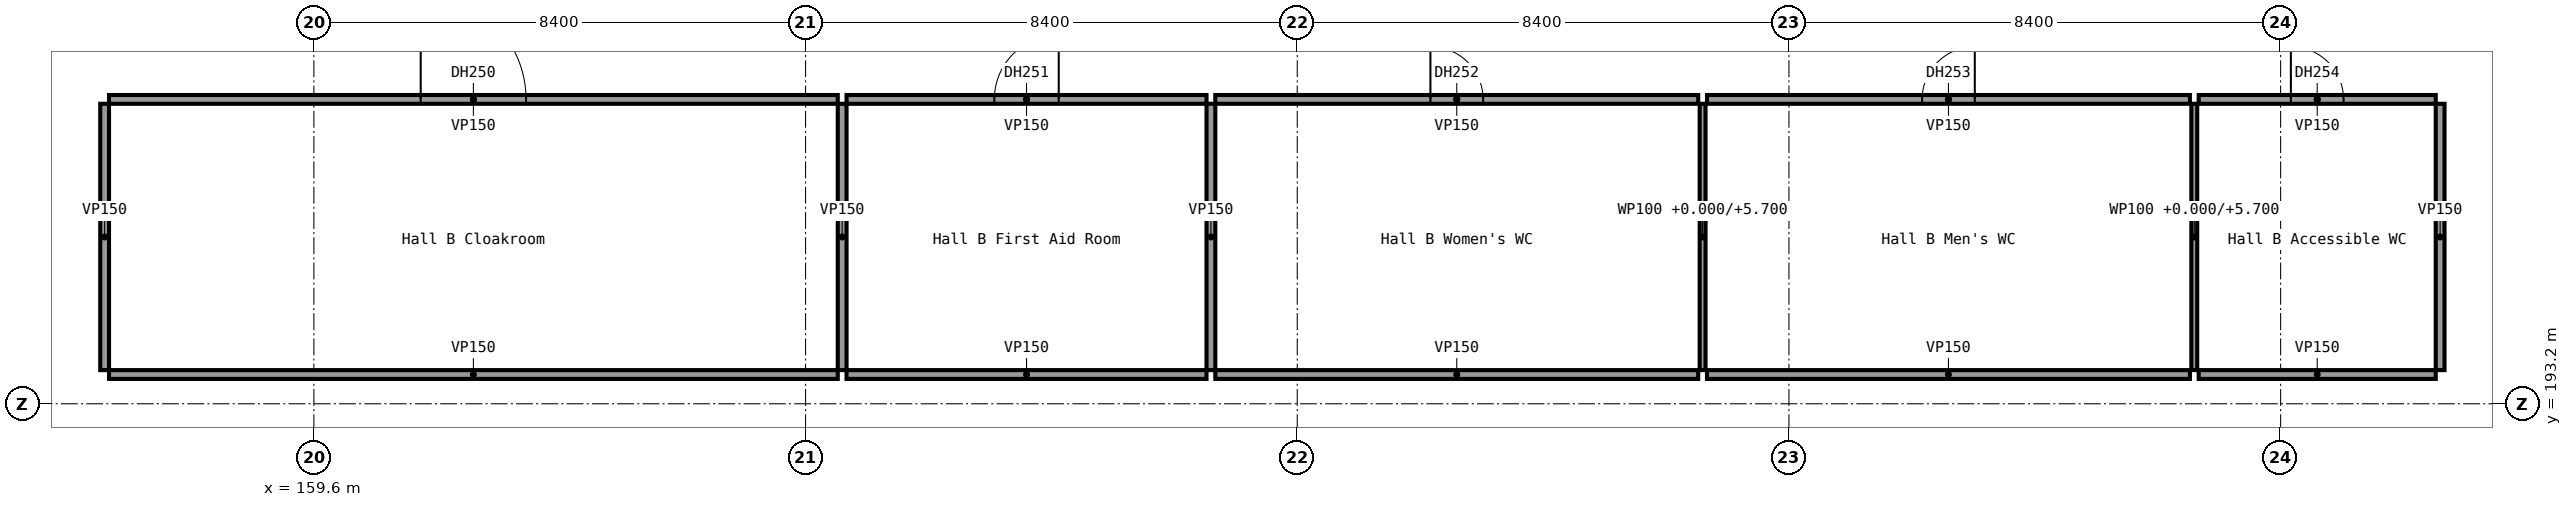
"""IFC4 building model, lengths in metres.
Left out: names, types, materials, properties, quantities, classifications, styles, units other than length and angle.
Written with IfcOpenShell. Run it as: python <this file> out.ifc"""

import sys

from ifc_helpers import new_model, si_unit, direction, frame, frame_2d, origin, place, context, subcontext, project, spatial, rectangle, extrude, element, fill, save


model = new_model("IFC4")
c1 = context("Model", 3, precision=1e-05, world=origin(), true_north=direction((0.0, 1.0)))
c2 = subcontext(c1, "Body", "Model", "MODEL_VIEW")
j1 = project(units=[si_unit("LENGTHUNIT", "METRE"), si_unit("PLANEANGLEUNIT", "RADIAN")], contexts=[c1])
p1 = place(None, origin())
s1 = spatial("IfcSite", under=j1, at=p1, CompositionType="ELEMENT")
p2 = place(p1, origin())
s2 = spatial("IfcBuilding", under=s1, at=p2, CompositionType="ELEMENT")
p3 = place(p2, origin())
s3 = spatial("IfcBuildingStorey", under=s2, at=p3, CompositionType="ELEMENT", Elevation=0.0)
p4 = place(p3, frame((156.1, 193.7, 0.0), z_axis=(0.0, 0.0, 1.0), x_axis=(1.0, 0.0, 0.0)))
e1 = element("IfcWall", 1, at=p4, inside=s3, PredefinedType="PARTITIONING", context=c2, shape_type="SweptSolid", body=[
    extrude(rectangle(XDim=12.45, YDim=0.15, at=frame_2d((6.225, 0.0))), origin(), (0.0, 0.0, 1.0), 5.7),
])
p5 = place(p3, frame((156.1, 198.4, 0.0), z_axis=(0.0, 0.0, 1.0), x_axis=(1.0, 0.0, 0.0)))
e2 = element("IfcWall", 2, at=p5, inside=s3, PredefinedType="PARTITIONING", context=c2, shape_type="SweptSolid", body=[
    extrude(rectangle(XDim=12.45, YDim=0.15, at=frame_2d((6.225, 0.0))), origin(), (0.0, 0.0, 1.0), 5.7),
])
p6 = place(p5, frame((5.325, 0.0, 0.0)))
e3 = element("IfcOpeningElement", 3, at=p6, cuts=e2, PredefinedType="OPENING", context=c2, shape_type="SweptSolid", body=[
    extrude(rectangle(XDim=1.8, YDim=2.1, at=frame_2d((0.9, 1.05))), frame((0.0, 0.075, 0.0), z_axis=(0.0, -1.0, 0.0), x_axis=(1.0, 0.0, 0.0)), (0.0, 0.0, 1.0), 0.15),
])
p7 = place(p3, frame((168.7, 193.7, 0.0), z_axis=(0.0, 0.0, 1.0), x_axis=(1.0, 0.0, 0.0)))
e4 = element("IfcWall", 4, at=p7, inside=s3, PredefinedType="PARTITIONING", context=c2, shape_type="SweptSolid", body=[
    extrude(rectangle(XDim=6.15, YDim=0.15, at=frame_2d((3.075, 0.0))), origin(), (0.0, 0.0, 1.0), 5.7),
])
p8 = place(p3, frame((168.7, 198.4, 0.0), z_axis=(0.0, 0.0, 1.0), x_axis=(1.0, 0.0, 0.0)))
e5 = element("IfcWall", 5, at=p8, inside=s3, PredefinedType="PARTITIONING", context=c2, shape_type="SweptSolid", body=[
    extrude(rectangle(XDim=6.15, YDim=0.15, at=frame_2d((3.075, 0.0))), origin(), (0.0, 0.0, 1.0), 5.7),
])
p9 = place(p8, frame((2.525, 0.0, 0.0)))
e6 = element("IfcOpeningElement", 6, at=p9, cuts=e5, PredefinedType="OPENING", context=c2, shape_type="SweptSolid", body=[
    extrude(rectangle(XDim=1.1, YDim=2.1, at=frame_2d((0.55, 1.05))), frame((0.0, 0.075, 0.0), z_axis=(0.0, -1.0, 0.0), x_axis=(1.0, 0.0, 0.0)), (0.0, 0.0, 1.0), 0.15),
])
p10 = place(p3, frame((175.0, 193.7, 0.0), z_axis=(0.0, 0.0, 1.0), x_axis=(1.0, 0.0, 0.0)))
e7 = element("IfcWall", 7, at=p10, inside=s3, PredefinedType="PARTITIONING", context=c2, shape_type="SweptSolid", body=[
    extrude(rectangle(XDim=8.25, YDim=0.15, at=frame_2d((4.125, 0.0))), origin(), (0.0, 0.0, 1.0), 5.7),
])
p11 = place(p3, frame((175.0, 198.4, 0.0), z_axis=(0.0, 0.0, 1.0), x_axis=(1.0, 0.0, 0.0)))
e8 = element("IfcWall", 8, at=p11, inside=s3, PredefinedType="PARTITIONING", context=c2, shape_type="SweptSolid", body=[
    extrude(rectangle(XDim=8.25, YDim=0.15, at=frame_2d((4.125, 0.0))), origin(), (0.0, 0.0, 1.0), 5.7),
])
p12 = place(p11, frame((3.675, 0.0, 0.0)))
e9 = element("IfcOpeningElement", 9, at=p12, cuts=e8, PredefinedType="OPENING", context=c2, shape_type="SweptSolid", body=[
    extrude(rectangle(XDim=0.9, YDim=2.1, at=frame_2d((0.45, 1.05))), frame((0.0, 0.075, 0.0), z_axis=(0.0, -1.0, 0.0), x_axis=(1.0, 0.0, 0.0)), (0.0, 0.0, 1.0), 0.15),
])
p13 = place(p3, frame((183.4, 193.7, 0.0), z_axis=(0.0, 0.0, 1.0), x_axis=(1.0, 0.0, 0.0)))
e10 = element("IfcWall", 10, at=p13, inside=s3, PredefinedType="PARTITIONING", context=c2, shape_type="SweptSolid", body=[
    extrude(rectangle(XDim=8.25, YDim=0.15, at=frame_2d((4.125, 0.0))), origin(), (0.0, 0.0, 1.0), 5.7),
])
p14 = place(p3, frame((183.4, 198.4, 0.0), z_axis=(0.0, 0.0, 1.0), x_axis=(1.0, 0.0, 0.0)))
e11 = element("IfcWall", 11, at=p14, inside=s3, PredefinedType="PARTITIONING", context=c2, shape_type="SweptSolid", body=[
    extrude(rectangle(XDim=8.25, YDim=0.15, at=frame_2d((4.125, 0.0))), origin(), (0.0, 0.0, 1.0), 5.7),
])
p15 = place(p14, frame((3.675, 0.0, 0.0)))
e12 = element("IfcOpeningElement", 12, at=p15, cuts=e11, PredefinedType="OPENING", context=c2, shape_type="SweptSolid", body=[
    extrude(rectangle(XDim=0.9, YDim=2.1, at=frame_2d((0.45, 1.05))), frame((0.0, 0.075, 0.0), z_axis=(0.0, -1.0, 0.0), x_axis=(1.0, 0.0, 0.0)), (0.0, 0.0, 1.0), 0.15),
])
p16 = place(p3, frame((191.8, 193.7, 0.0), z_axis=(0.0, 0.0, 1.0), x_axis=(1.0, 0.0, 0.0)))
e13 = element("IfcWall", 13, at=p16, inside=s3, PredefinedType="PARTITIONING", context=c2, shape_type="SweptSolid", body=[
    extrude(rectangle(XDim=4.05, YDim=0.15, at=frame_2d((2.025, 0.0))), origin(), (0.0, 0.0, 1.0), 5.7),
])
p17 = place(p3, frame((191.8, 198.4, 0.0), z_axis=(0.0, 0.0, 1.0), x_axis=(1.0, 0.0, 0.0)))
e14 = element("IfcWall", 14, at=p17, inside=s3, PredefinedType="PARTITIONING", context=c2, shape_type="SweptSolid", body=[
    extrude(rectangle(XDim=4.05, YDim=0.15, at=frame_2d((2.025, 0.0))), origin(), (0.0, 0.0, 1.0), 5.7),
])
p18 = place(p17, frame((1.575, 0.0, 0.0)))
e15 = element("IfcOpeningElement", 15, at=p18, cuts=e14, PredefinedType="OPENING", context=c2, shape_type="SweptSolid", body=[
    extrude(rectangle(XDim=0.9, YDim=2.1, at=frame_2d((0.45, 1.05))), frame((0.0, 0.075, 0.0), z_axis=(0.0, -1.0, 0.0), x_axis=(1.0, 0.0, 0.0)), (0.0, 0.0, 1.0), 0.15),
])
for number, where, z_axis, x_axis in (
    (16, (156.025, 193.775, 0.0), (0.0, 0.0, 1.0), (0.0, 1.0, 0.0)),
    (17, (168.625, 193.775, 0.0), (0.0, 0.0, 1.0), (0.0, 1.0, 0.0)),
    (18, (174.925, 193.775, 0.0), (0.0, 0.0, 1.0), (0.0, 1.0, 0.0)),
):
    element("IfcWall", number, at=place(p3, frame(where, z_axis=z_axis, x_axis=x_axis)), inside=s3, PredefinedType="PARTITIONING", context=c2, shape_type="SweptSolid", body=[
        extrude(rectangle(XDim=4.55, YDim=0.15, at=frame_2d((2.275, 0.0))), origin(), (0.0, 0.0, 1.0), 5.7),
    ])
for number, where, z_axis, x_axis in (
    (19, (183.325, 193.775, 0.0), (0.0, 0.0, 1.0), (0.0, 1.0, 0.0)),
    (20, (191.725, 193.775, 0.0), (0.0, 0.0, 1.0), (0.0, 1.0, 0.0)),
):
    element("IfcWall", number, at=place(p3, frame(where, z_axis=z_axis, x_axis=x_axis)), inside=s3, PredefinedType="PARTITIONING", context=c2, shape_type="SweptSolid", body=[
        extrude(rectangle(XDim=4.55, YDim=0.1, at=frame_2d((2.275, 0.0))), origin(), (0.0, 0.0, 1.0), 5.7),
    ])
p19 = place(p3, frame((195.925, 193.775, 0.0), z_axis=(0.0, 0.0, 1.0), x_axis=(0.0, 1.0, 0.0)))
e21 = element("IfcWall", 21, at=p19, inside=s3, PredefinedType="PARTITIONING", context=c2, shape_type="SweptSolid", body=[
    extrude(rectangle(XDim=4.55, YDim=0.15, at=frame_2d((2.275, 0.0))), origin(), (0.0, 0.0, 1.0), 5.7),
])
p20 = place(p6, origin())
e22 = element("IfcDoor", 22, at=p20, inside=s3, OperationType="DOUBLE_DOOR_SINGLE_SWING", PredefinedType="DOOR", context=c2, shape_type="SweptSolid", body=[
    extrude(rectangle(XDim=1.8, YDim=2.1, at=frame_2d((0.9, 1.05))), frame((0.0, 0.025, 0.0), z_axis=(0.0, -1.0, 0.0), x_axis=(1.0, 0.0, 0.0)), (0.0, 0.0, 1.0), 0.05),
])
fill(e3, e22)
p21 = place(p9, origin())
e23 = element("IfcDoor", 23, at=p21, inside=s3, OperationType="SINGLE_SWING_RIGHT", PredefinedType="DOOR", context=c2, shape_type="SweptSolid", body=[
    extrude(rectangle(XDim=1.1, YDim=2.1, at=frame_2d((0.55, 1.05))), frame((0.0, 0.025, 0.0), z_axis=(0.0, -1.0, 0.0), x_axis=(1.0, 0.0, 0.0)), (0.0, 0.0, 1.0), 0.05),
])
fill(e6, e23)
p22 = place(p12, origin())
e24 = element("IfcDoor", 24, at=p22, inside=s3, OperationType="SINGLE_SWING_LEFT", PredefinedType="DOOR", context=c2, shape_type="SweptSolid", body=[
    extrude(rectangle(XDim=0.9, YDim=2.1, at=frame_2d((0.45, 1.05))), frame((0.0, 0.025, 0.0), z_axis=(0.0, -1.0, 0.0), x_axis=(1.0, 0.0, 0.0)), (0.0, 0.0, 1.0), 0.05),
])
fill(e9, e24)
p23 = place(p15, origin())
e25 = element("IfcDoor", 25, at=p23, inside=s3, OperationType="SINGLE_SWING_RIGHT", PredefinedType="DOOR", context=c2, shape_type="SweptSolid", body=[
    extrude(rectangle(XDim=0.9, YDim=2.1, at=frame_2d((0.45, 1.05))), frame((0.0, 0.025, 0.0), z_axis=(0.0, -1.0, 0.0), x_axis=(1.0, 0.0, 0.0)), (0.0, 0.0, 1.0), 0.05),
])
fill(e12, e25)
p24 = place(p18, origin())
e26 = element("IfcDoor", 26, at=p24, inside=s3, OperationType="SINGLE_SWING_LEFT", PredefinedType="DOOR", context=c2, shape_type="SweptSolid", body=[
    extrude(rectangle(XDim=0.9, YDim=2.1, at=frame_2d((0.45, 1.05))), frame((0.0, 0.025, 0.0), z_axis=(0.0, -1.0, 0.0), x_axis=(1.0, 0.0, 0.0)), (0.0, 0.0, 1.0), 0.05),
])
fill(e15, e26)
save(model, sys.argv[1])
